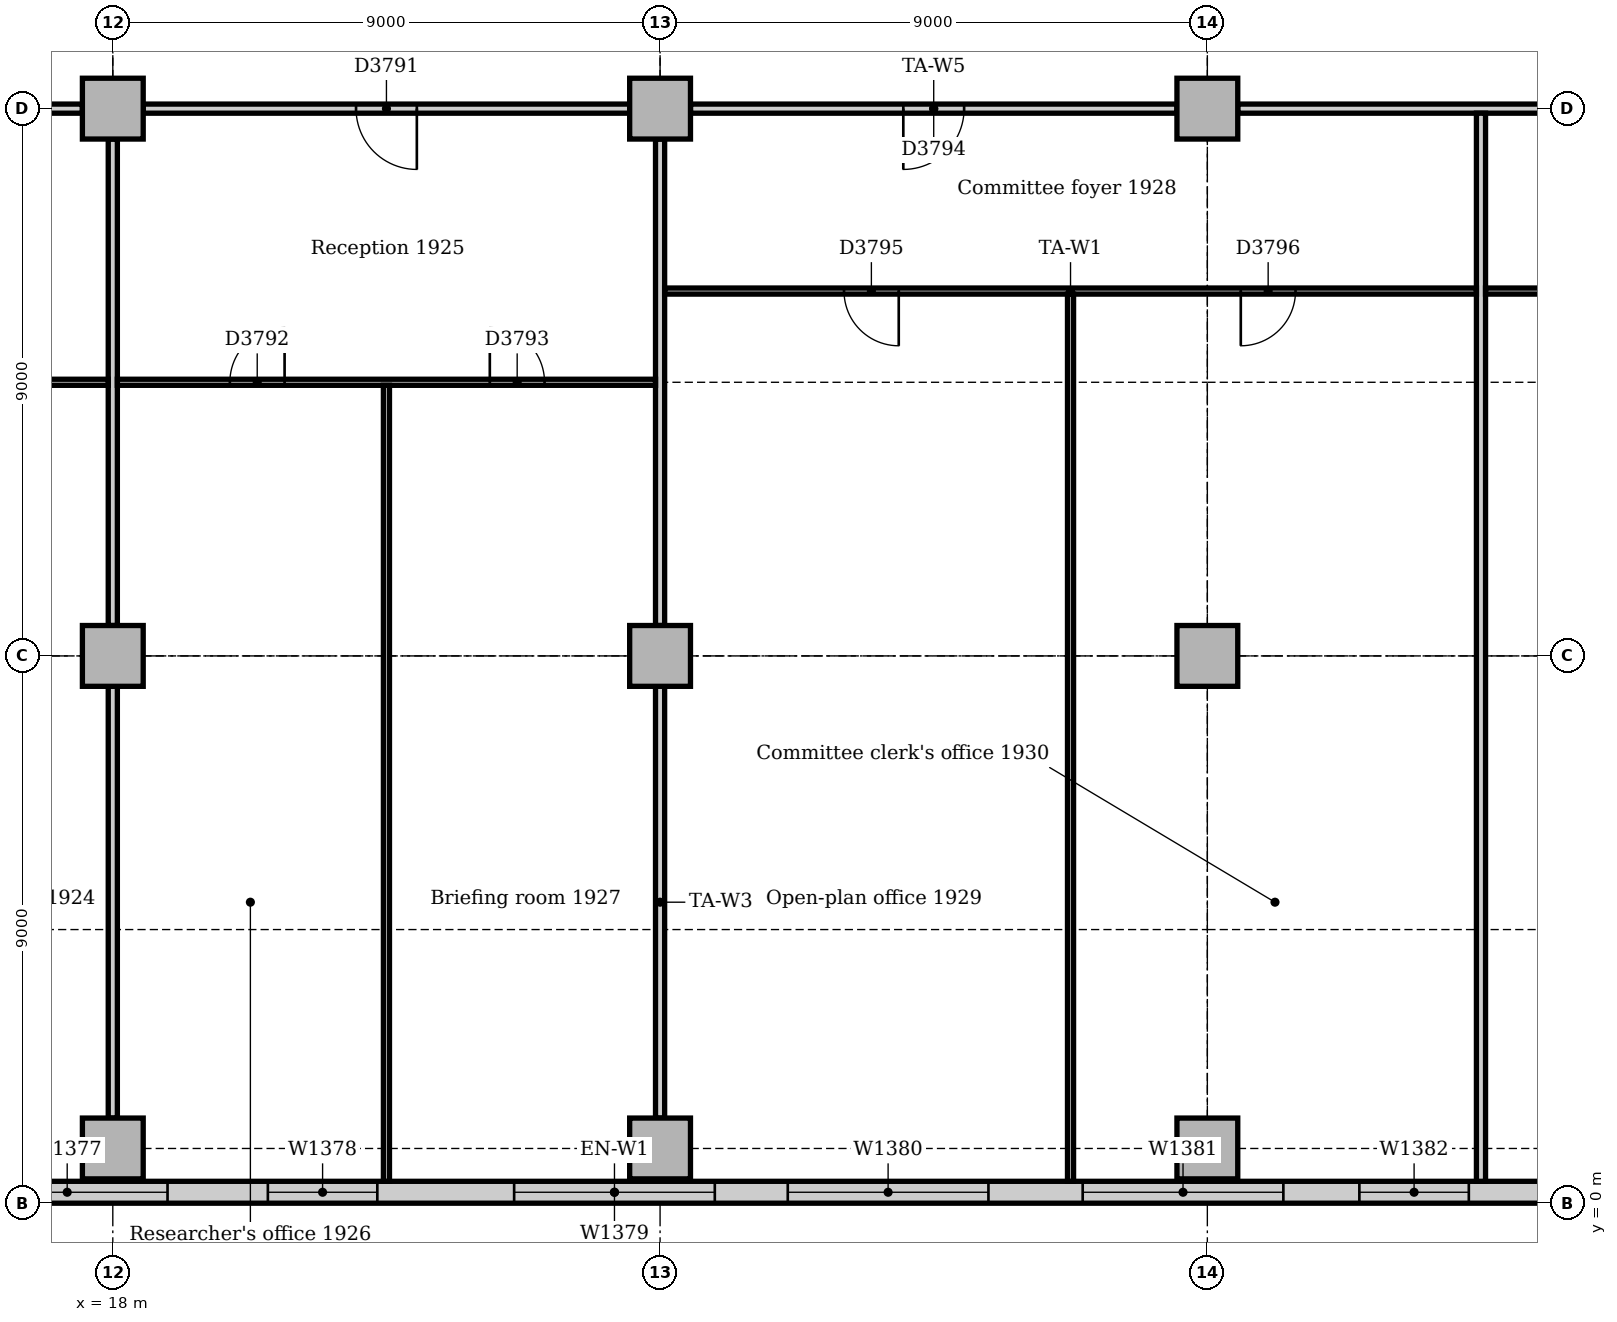
"""IFC4 building model, lengths in metres.
Left out: names, types, materials, properties, quantities, classifications, styles, units other than length and angle.
Written with IfcOpenShell. Run it as: python <this file> out.ifc"""

import sys

from ifc_helpers import new_model, si_unit, direction, frame, frame_2d, origin, origin_2d, place, context, subcontext, project, spatial, rectangle, extrude, element, fill, save


model = new_model("IFC4")
c1 = context("Model", 3, precision=1e-05, world=origin(), true_north=direction((0.0, 1.0)))
c2 = subcontext(c1, "Body", "Model", "MODEL_VIEW")
j1 = project(units=[si_unit("LENGTHUNIT", "METRE"), si_unit("PLANEANGLEUNIT", "RADIAN")], contexts=[c1])
p1 = place(None, origin())
s1 = spatial("IfcSite", under=j1, at=p1, CompositionType="ELEMENT")
p2 = place(p1, origin())
s2 = spatial("IfcBuilding", under=s1, at=p2, CompositionType="ELEMENT")
p3 = place(p2, frame((0.0, 0.0, 83.0)))
s3 = spatial("IfcBuildingStorey", under=s2, at=p3, CompositionType="ELEMENT", Elevation=83.0)
for number, where, z_axis, x_axis in (
    (1, (18.0, 0.9, 0.0), (0.0, 0.0, 1.0), (1.0, 0.0, 0.0)),
    (2, (27.0, 0.9, 0.0), (0.0, 0.0, 1.0), (1.0, 0.0, 0.0)),
    (3, (36.0, 0.9, 0.0), (0.0, 0.0, 1.0), (1.0, 0.0, 0.0)),
    (4, (18.0, 9.0, 0.0), (0.0, 0.0, 1.0), (1.0, 0.0, 0.0)),
    (5, (18.0, 18.0, 0.0), (0.0, 0.0, 1.0), (1.0, 0.0, 0.0)),
    (6, (27.0, 9.0, 0.0), (0.0, 0.0, 1.0), (1.0, 0.0, 0.0)),
    (7, (27.0, 18.0, 0.0), (0.0, 0.0, 1.0), (1.0, 0.0, 0.0)),
    (8, (36.0, 9.0, 0.0), (0.0, 0.0, 1.0), (1.0, 0.0, 0.0)),
    (9, (36.0, 18.0, 0.0), (0.0, 0.0, 1.0), (1.0, 0.0, 0.0)),
):
    element("IfcColumn", number, at=place(p3, frame(where, z_axis=z_axis, x_axis=x_axis)), inside=s3, PredefinedType="COLUMN", context=c2, shape_type="SweptSolid", body=[
        extrude(rectangle(XDim=1.0, YDim=1.0, at=origin_2d()), origin(), (0.0, 0.0, 1.0), 3.85),
    ])
p4 = place(p3, frame((4.243, 0.18, 0.0), z_axis=(0.0, 0.0, 1.0), x_axis=(1.0, 0.0, 0.0)))
e10 = element("IfcWall", 10, at=p4, inside=s3, PredefinedType="STANDARD", context=c2, shape_type="SweptSolid", body=[
    extrude(rectangle(XDim=44.015, YDim=0.36, at=frame_2d((22.007, 0.0))), origin(), (0.0, 0.0, 1.0), 3.85),
])
p5 = place(p4, frame((2.357, 0.0, 0.9)))
e11 = element("IfcOpeningElement", 11, at=p5, cuts=e10, PredefinedType="OPENING", context=c2, shape_type="SweptSolid", body=[
    extrude(rectangle(XDim=3.3, YDim=1.6, at=frame_2d((1.65, 0.8))), frame((0.0, 0.19, 0.0), z_axis=(0.0, -1.0, 0.0), x_axis=(1.0, 0.0, 0.0)), (0.0, 0.0, 1.0), 0.38),
])
p6 = place(p4, frame((7.307, 0.0, 0.9)))
e12 = element("IfcOpeningElement", 12, at=p6, cuts=e10, PredefinedType="OPENING", context=c2, shape_type="SweptSolid", body=[
    extrude(rectangle(XDim=1.8, YDim=1.6, at=frame_2d((0.9, 0.8))), frame((0.0, 0.19, 0.0), z_axis=(0.0, -1.0, 0.0), x_axis=(1.0, 0.0, 0.0)), (0.0, 0.0, 1.0), 0.38),
])
p7 = place(p4, frame((11.357, 0.0, 0.9)))
e13 = element("IfcOpeningElement", 13, at=p7, cuts=e10, PredefinedType="OPENING", context=c2, shape_type="SweptSolid", body=[
    extrude(rectangle(XDim=3.3, YDim=1.6, at=frame_2d((1.65, 0.8))), frame((0.0, 0.19, 0.0), z_axis=(0.0, -1.0, 0.0), x_axis=(1.0, 0.0, 0.0)), (0.0, 0.0, 1.0), 0.38),
])
p8 = place(p4, frame((16.307, 0.0, 0.9)))
e14 = element("IfcOpeningElement", 14, at=p8, cuts=e10, PredefinedType="OPENING", context=c2, shape_type="SweptSolid", body=[
    extrude(rectangle(XDim=1.8, YDim=1.6, at=frame_2d((0.9, 0.8))), frame((0.0, 0.19, 0.0), z_axis=(0.0, -1.0, 0.0), x_axis=(1.0, 0.0, 0.0)), (0.0, 0.0, 1.0), 0.38),
])
p9 = place(p4, frame((20.357, 0.0, 0.9)))
e15 = element("IfcOpeningElement", 15, at=p9, cuts=e10, PredefinedType="OPENING", context=c2, shape_type="SweptSolid", body=[
    extrude(rectangle(XDim=3.3, YDim=1.6, at=frame_2d((1.65, 0.8))), frame((0.0, 0.19, 0.0), z_axis=(0.0, -1.0, 0.0), x_axis=(1.0, 0.0, 0.0)), (0.0, 0.0, 1.0), 0.38),
])
p10 = place(p4, frame((24.857, 0.0, 0.9)))
e16 = element("IfcOpeningElement", 16, at=p10, cuts=e10, PredefinedType="OPENING", context=c2, shape_type="SweptSolid", body=[
    extrude(rectangle(XDim=3.3, YDim=1.6, at=frame_2d((1.65, 0.8))), frame((0.0, 0.19, 0.0), z_axis=(0.0, -1.0, 0.0), x_axis=(1.0, 0.0, 0.0)), (0.0, 0.0, 1.0), 0.38),
])
p11 = place(p4, frame((29.707, 0.0, 0.9)))
e17 = element("IfcOpeningElement", 17, at=p11, cuts=e10, PredefinedType="OPENING", context=c2, shape_type="SweptSolid", body=[
    extrude(rectangle(XDim=3.3, YDim=1.6, at=frame_2d((1.65, 0.8))), frame((0.0, 0.19, 0.0), z_axis=(0.0, -1.0, 0.0), x_axis=(1.0, 0.0, 0.0)), (0.0, 0.0, 1.0), 0.38),
])
p12 = place(p4, frame((34.257, 0.0, 0.9)))
e18 = element("IfcOpeningElement", 18, at=p12, cuts=e10, PredefinedType="OPENING", context=c2, shape_type="SweptSolid", body=[
    extrude(rectangle(XDim=1.8, YDim=1.6, at=frame_2d((0.9, 0.8))), frame((0.0, 0.19, 0.0), z_axis=(0.0, -1.0, 0.0), x_axis=(1.0, 0.0, 0.0)), (0.0, 0.0, 1.0), 0.38),
])
p13 = place(p4, frame((38.357, 0.0, 0.9)))
e19 = element("IfcOpeningElement", 19, at=p13, cuts=e10, PredefinedType="OPENING", context=c2, shape_type="SweptSolid", body=[
    extrude(rectangle(XDim=3.3, YDim=1.6, at=frame_2d((1.65, 0.8))), frame((0.0, 0.19, 0.0), z_axis=(0.0, -1.0, 0.0), x_axis=(1.0, 0.0, 0.0)), (0.0, 0.0, 1.0), 0.38),
])
p14 = place(p3, frame((36.5, 18.0, 0.0), z_axis=(0.0, 0.0, 1.0), x_axis=(1.0, 0.0, 0.0)))
e20 = element("IfcWall", 20, at=p14, inside=s3, PredefinedType="PARTITIONING", context=c2, shape_type="SweptSolid", body=[
    extrude(rectangle(XDim=8.0, YDim=0.15, at=frame_2d((4.0, 0.0))), origin(), (0.0, 0.0, 1.0), 3.15),
])
p15 = place(p3, frame((27.5, 18.0, 0.0), z_axis=(0.0, 0.0, 1.0), x_axis=(1.0, 0.0, 0.0)))
e21 = element("IfcWall", 21, at=p15, inside=s3, PredefinedType="PARTITIONING", context=c2, shape_type="SweptSolid", body=[
    extrude(rectangle(XDim=8.0, YDim=0.15, at=frame_2d((4.0, 0.0))), origin(), (0.0, 0.0, 1.0), 3.15),
])
p16 = place(p15, frame((3.5, 0.0, 0.0)))
e22 = element("IfcOpeningElement", 22, at=p16, cuts=e21, PredefinedType="OPENING", context=c2, shape_type="SweptSolid", body=[
    extrude(rectangle(XDim=1.0, YDim=2.1, at=frame_2d((0.5, 1.05))), frame((0.0, 0.085, 0.0), z_axis=(0.0, -1.0, 0.0), x_axis=(1.0, 0.0, 0.0)), (0.0, 0.0, 1.0), 0.17),
])
p17 = place(p3, frame((18.5, 18.0, 0.0), z_axis=(0.0, 0.0, 1.0), x_axis=(1.0, 0.0, 0.0)))
e23 = element("IfcWall", 23, at=p17, inside=s3, PredefinedType="PARTITIONING", context=c2, shape_type="SweptSolid", body=[
    extrude(rectangle(XDim=8.0, YDim=0.15, at=frame_2d((4.0, 0.0))), origin(), (0.0, 0.0, 1.0), 3.15),
])
p18 = place(p17, frame((3.5, 0.0, 0.0)))
e24 = element("IfcOpeningElement", 24, at=p18, cuts=e23, PredefinedType="OPENING", context=c2, shape_type="SweptSolid", body=[
    extrude(rectangle(XDim=1.0, YDim=2.1, at=frame_2d((0.5, 1.05))), frame((0.0, 0.085, 0.0), z_axis=(0.0, -1.0, 0.0), x_axis=(1.0, 0.0, 0.0)), (0.0, 0.0, 1.0), 0.17),
])
p19 = place(p3, frame((9.5, 18.0, 0.0), z_axis=(0.0, 0.0, 1.0), x_axis=(1.0, 0.0, 0.0)))
e25 = element("IfcWall", 25, at=p19, inside=s3, PredefinedType="PARTITIONING", context=c2, shape_type="SweptSolid", body=[
    extrude(rectangle(XDim=8.0, YDim=0.15, at=frame_2d((4.0, 0.0))), origin(), (0.0, 0.0, 1.0), 3.15),
])
p20 = place(p19, frame((3.5, 0.0, 0.0)))
e26 = element("IfcOpeningElement", 26, at=p20, cuts=e25, PredefinedType="OPENING", context=c2, shape_type="SweptSolid", body=[
    extrude(rectangle(XDim=1.0, YDim=2.1, at=frame_2d((0.5, 1.05))), frame((0.0, 0.085, 0.0), z_axis=(0.0, -1.0, 0.0), x_axis=(1.0, 0.0, 0.0)), (0.0, 0.0, 1.0), 0.17),
])
p21 = place(p3, frame((18.0, 1.4, 0.0), z_axis=(0.0, 0.0, 1.0), x_axis=(0.0, 1.0, 0.0)))
e27 = element("IfcWall", 27, at=p21, inside=s3, PredefinedType="PARTITIONING", context=c2, shape_type="SweptSolid", body=[
    extrude(rectangle(XDim=7.1, YDim=0.15, at=frame_2d((3.55, 0.0))), origin(), (0.0, 0.0, 1.0), 3.158),
])
p22 = place(p3, frame((18.0, 9.5, 0.0), z_axis=(0.0, 0.0, 1.0), x_axis=(0.0, 1.0, 0.0)))
e28 = element("IfcWall", 28, at=p22, inside=s3, PredefinedType="PARTITIONING", context=c2, shape_type="SweptSolid", body=[
    extrude(rectangle(XDim=8.0, YDim=0.15, at=frame_2d((4.0, 0.0))), origin(), (0.0, 0.0, 1.0), 3.158),
])
p23 = place(p3, frame((27.0, 1.4, 0.0), z_axis=(0.0, 0.0, 1.0), x_axis=(0.0, 1.0, 0.0)))
e29 = element("IfcWall", 29, at=p23, inside=s3, PredefinedType="PARTITIONING", context=c2, shape_type="SweptSolid", body=[
    extrude(rectangle(XDim=7.1, YDim=0.15, at=frame_2d((3.55, 0.0))), origin(), (0.0, 0.0, 1.0), 3.158),
])
p24 = place(p3, frame((27.0, 9.5, 0.0), z_axis=(0.0, 0.0, 1.0), x_axis=(0.0, 1.0, 0.0)))
e30 = element("IfcWall", 30, at=p24, inside=s3, PredefinedType="PARTITIONING", context=c2, shape_type="SweptSolid", body=[
    extrude(rectangle(XDim=8.0, YDim=0.15, at=frame_2d((4.0, 0.0))), origin(), (0.0, 0.0, 1.0), 3.158),
])
p25 = place(p3, frame((40.5, 0.36, 0.0), z_axis=(0.0, 0.0, 1.0), x_axis=(0.0, 1.0, 0.0)))
e31 = element("IfcWall", 31, at=p25, inside=s3, PredefinedType="PARTITIONING", context=c2, shape_type="SweptSolid", body=[
    extrude(rectangle(XDim=17.565, YDim=0.15, at=frame_2d((8.783, 0.0))), origin(), (0.0, 0.0, 1.0), 3.85),
])
p26 = place(p3, frame((27.075, 15.0, 0.0), z_axis=(0.0, 0.0, 1.0), x_axis=(1.0, 0.0, 0.0)))
e32 = element("IfcWall", 32, at=p26, inside=s3, PredefinedType="PARTITIONING", context=c2, shape_type="SweptSolid", body=[
    extrude(rectangle(XDim=13.35, YDim=0.1, at=frame_2d((6.675, 0.0))), origin(), (0.0, 0.0, 1.0), 3.85),
])
p27 = place(p26, frame((2.95, 0.0, 0.0)))
e33 = element("IfcOpeningElement", 33, at=p27, cuts=e32, PredefinedType="OPENING", context=c2, shape_type="SweptSolid", body=[
    extrude(rectangle(XDim=0.9, YDim=2.1, at=frame_2d((0.45, 1.05))), frame((0.0, 0.06, 0.0), z_axis=(0.0, -1.0, 0.0), x_axis=(1.0, 0.0, 0.0)), (0.0, 0.0, 1.0), 0.12),
])
p28 = place(p26, frame((9.475, 0.0, 0.0)))
e34 = element("IfcOpeningElement", 34, at=p28, cuts=e32, PredefinedType="OPENING", context=c2, shape_type="SweptSolid", body=[
    extrude(rectangle(XDim=0.9, YDim=2.1, at=frame_2d((0.45, 1.05))), frame((0.0, 0.06, 0.0), z_axis=(0.0, -1.0, 0.0), x_axis=(1.0, 0.0, 0.0)), (0.0, 0.0, 1.0), 0.12),
])
p29 = place(p3, frame((40.575, 15.0, 0.0), z_axis=(0.0, 0.0, 1.0), x_axis=(1.0, 0.0, 0.0)))
e35 = element("IfcWall", 35, at=p29, inside=s3, PredefinedType="PARTITIONING", context=c2, shape_type="SweptSolid", body=[
    extrude(rectangle(XDim=13.35, YDim=0.1, at=frame_2d((6.675, 0.0))), origin(), (0.0, 0.0, 1.0), 3.85),
])
p30 = place(p29, frame((6.2, 0.0, 0.0)))
e36 = element("IfcOpeningElement", 36, at=p30, cuts=e35, PredefinedType="OPENING", context=c2, shape_type="SweptSolid", body=[
    extrude(rectangle(XDim=0.9, YDim=2.1, at=frame_2d((0.45, 1.05))), frame((0.0, 0.06, 0.0), z_axis=(0.0, -1.0, 0.0), x_axis=(1.0, 0.0, 0.0)), (0.0, 0.0, 1.0), 0.12),
])
p31 = place(p3, frame((18.075, 13.5, 0.0), z_axis=(0.0, 0.0, 1.0), x_axis=(1.0, 0.0, 0.0)))
e37 = element("IfcWall", 37, at=p31, inside=s3, PredefinedType="PARTITIONING", context=c2, shape_type="SweptSolid", body=[
    extrude(rectangle(XDim=8.85, YDim=0.1, at=frame_2d((4.425, 0.0))), origin(), (0.0, 0.0, 1.0), 3.35),
])
p32 = place(p31, frame((1.85, 0.0, 0.0)))
e38 = element("IfcOpeningElement", 38, at=p32, cuts=e37, PredefinedType="OPENING", context=c2, shape_type="SweptSolid", body=[
    extrude(rectangle(XDim=0.9, YDim=2.1, at=frame_2d((0.45, 1.05))), frame((0.0, 0.06, 0.0), z_axis=(0.0, -1.0, 0.0), x_axis=(1.0, 0.0, 0.0)), (0.0, 0.0, 1.0), 0.12),
])
p33 = place(p31, frame((6.125, 0.0, 0.0)))
e39 = element("IfcOpeningElement", 39, at=p33, cuts=e37, PredefinedType="OPENING", context=c2, shape_type="SweptSolid", body=[
    extrude(rectangle(XDim=0.9, YDim=2.1, at=frame_2d((0.45, 1.05))), frame((0.0, 0.06, 0.0), z_axis=(0.0, -1.0, 0.0), x_axis=(1.0, 0.0, 0.0)), (0.0, 0.0, 1.0), 0.12),
])
p34 = place(p3, frame((9.075, 13.5, 0.0), z_axis=(0.0, 0.0, 1.0), x_axis=(1.0, 0.0, 0.0)))
e40 = element("IfcWall", 40, at=p34, inside=s3, PredefinedType="PARTITIONING", context=c2, shape_type="SweptSolid", body=[
    extrude(rectangle(XDim=8.85, YDim=0.1, at=frame_2d((4.425, 0.0))), origin(), (0.0, 0.0, 1.0), 3.35),
])
p35 = place(p34, frame((1.85, 0.0, 0.0)))
e41 = element("IfcOpeningElement", 41, at=p35, cuts=e40, PredefinedType="OPENING", context=c2, shape_type="SweptSolid", body=[
    extrude(rectangle(XDim=0.9, YDim=2.1, at=frame_2d((0.45, 1.05))), frame((0.0, 0.06, 0.0), z_axis=(0.0, -1.0, 0.0), x_axis=(1.0, 0.0, 0.0)), (0.0, 0.0, 1.0), 0.12),
])
p36 = place(p34, frame((6.125, 0.0, 0.0)))
e42 = element("IfcOpeningElement", 42, at=p36, cuts=e40, PredefinedType="OPENING", context=c2, shape_type="SweptSolid", body=[
    extrude(rectangle(XDim=0.9, YDim=2.1, at=frame_2d((0.45, 1.05))), frame((0.0, 0.06, 0.0), z_axis=(0.0, -1.0, 0.0), x_axis=(1.0, 0.0, 0.0)), (0.0, 0.0, 1.0), 0.12),
])
p37 = place(p3, frame((33.75, 0.36, 0.0), z_axis=(0.0, 0.0, 1.0), x_axis=(0.0, 1.0, 0.0)))
e43 = element("IfcWall", 43, at=p37, inside=s3, PredefinedType="PARTITIONING", context=c2, shape_type="SweptSolid", body=[
    extrude(rectangle(XDim=14.59, YDim=0.1, at=frame_2d((7.295, 0.0))), origin(), (0.0, 0.0, 1.0), 3.85),
])
p38 = place(p3, frame((22.5, 0.36, 0.0), z_axis=(0.0, 0.0, 1.0), x_axis=(0.0, 1.0, 0.0)))
e44 = element("IfcWall", 44, at=p38, inside=s3, PredefinedType="PARTITIONING", context=c2, shape_type="SweptSolid", body=[
    extrude(rectangle(XDim=13.09, YDim=0.1, at=frame_2d((6.545, 0.0))), origin(), (0.0, 0.0, 1.0), 3.85),
])
p39 = place(p7, origin())
e45 = element("IfcWindow", 45, at=p39, inside=s3, PartitioningType="SINGLE_PANEL", PredefinedType="WINDOW", context=c2, shape_type="SweptSolid", body=[
    extrude(rectangle(XDim=3.3, YDim=1.6, at=frame_2d((1.65, 0.8))), frame((0.0, 0.13, 0.0), z_axis=(0.0, -1.0, 0.0), x_axis=(1.0, 0.0, 0.0)), (0.0, 0.0, 1.0), 0.06),
])
fill(e13, e45)
p40 = place(p8, origin())
e46 = element("IfcWindow", 46, at=p40, inside=s3, PartitioningType="SINGLE_PANEL", PredefinedType="WINDOW", context=c2, shape_type="SweptSolid", body=[
    extrude(rectangle(XDim=1.8, YDim=1.6, at=frame_2d((0.9, 0.8))), frame((0.0, 0.13, 0.0), z_axis=(0.0, -1.0, 0.0), x_axis=(1.0, 0.0, 0.0)), (0.0, 0.0, 1.0), 0.06),
])
fill(e14, e46)
p41 = place(p9, origin())
e47 = element("IfcWindow", 47, at=p41, inside=s3, PartitioningType="SINGLE_PANEL", PredefinedType="WINDOW", context=c2, shape_type="SweptSolid", body=[
    extrude(rectangle(XDim=3.3, YDim=1.6, at=frame_2d((1.65, 0.8))), frame((0.0, 0.13, 0.0), z_axis=(0.0, -1.0, 0.0), x_axis=(1.0, 0.0, 0.0)), (0.0, 0.0, 1.0), 0.06),
])
fill(e15, e47)
p42 = place(p10, origin())
e48 = element("IfcWindow", 48, at=p42, inside=s3, PartitioningType="SINGLE_PANEL", PredefinedType="WINDOW", context=c2, shape_type="SweptSolid", body=[
    extrude(rectangle(XDim=3.3, YDim=1.6, at=frame_2d((1.65, 0.8))), frame((0.0, 0.13, 0.0), z_axis=(0.0, -1.0, 0.0), x_axis=(1.0, 0.0, 0.0)), (0.0, 0.0, 1.0), 0.06),
])
fill(e16, e48)
p43 = place(p11, origin())
e49 = element("IfcWindow", 49, at=p43, inside=s3, PartitioningType="SINGLE_PANEL", PredefinedType="WINDOW", context=c2, shape_type="SweptSolid", body=[
    extrude(rectangle(XDim=3.3, YDim=1.6, at=frame_2d((1.65, 0.8))), frame((0.0, 0.13, 0.0), z_axis=(0.0, -1.0, 0.0), x_axis=(1.0, 0.0, 0.0)), (0.0, 0.0, 1.0), 0.06),
])
fill(e17, e49)
p44 = place(p12, origin())
e50 = element("IfcWindow", 50, at=p44, inside=s3, PartitioningType="SINGLE_PANEL", PredefinedType="WINDOW", context=c2, shape_type="SweptSolid", body=[
    extrude(rectangle(XDim=1.8, YDim=1.6, at=frame_2d((0.9, 0.8))), frame((0.0, 0.13, 0.0), z_axis=(0.0, -1.0, 0.0), x_axis=(1.0, 0.0, 0.0)), (0.0, 0.0, 1.0), 0.06),
])
fill(e18, e50)
p45 = place(p18, frame((1.0, 0.0, 0.0), z_axis=(0.0, 0.0, 1.0), x_axis=(-1.0, 0.0, 0.0)))
e51 = element("IfcDoor", 51, at=p45, inside=s3, OperationType="SINGLE_SWING_LEFT", PredefinedType="DOOR", context=c2, shape_type="SweptSolid", body=[
    extrude(rectangle(XDim=1.0, YDim=2.1, at=frame_2d((0.5, 1.05))), frame((0.0, 0.025, 0.0), z_axis=(0.0, -1.0, 0.0), x_axis=(1.0, 0.0, 0.0)), (0.0, 0.0, 1.0), 0.05),
])
fill(e24, e51)
p46 = place(p32, origin())
e52 = element("IfcDoor", 52, at=p46, inside=s3, OperationType="SINGLE_SWING_RIGHT", PredefinedType="DOOR", context=c2, shape_type="SweptSolid", body=[
    extrude(rectangle(XDim=0.9, YDim=2.1, at=frame_2d((0.45, 1.05))), frame((0.0, 0.025, 0.0), z_axis=(0.0, -1.0, 0.0), x_axis=(1.0, 0.0, 0.0)), (0.0, 0.0, 1.0), 0.05),
])
fill(e38, e52)
p47 = place(p33, origin())
e53 = element("IfcDoor", 53, at=p47, inside=s3, OperationType="SINGLE_SWING_LEFT", PredefinedType="DOOR", context=c2, shape_type="SweptSolid", body=[
    extrude(rectangle(XDim=0.9, YDim=2.1, at=frame_2d((0.45, 1.05))), frame((0.0, 0.025, 0.0), z_axis=(0.0, -1.0, 0.0), x_axis=(1.0, 0.0, 0.0)), (0.0, 0.0, 1.0), 0.05),
])
fill(e39, e53)
p48 = place(p16, frame((1.0, 0.0, 0.0), z_axis=(0.0, 0.0, 1.0), x_axis=(-1.0, 0.0, 0.0)))
e54 = element("IfcDoor", 54, at=p48, inside=s3, OperationType="SINGLE_SWING_RIGHT", PredefinedType="DOOR", context=c2, shape_type="SweptSolid", body=[
    extrude(rectangle(XDim=1.0, YDim=2.1, at=frame_2d((0.5, 1.05))), frame((0.0, 0.025, 0.0), z_axis=(0.0, -1.0, 0.0), x_axis=(1.0, 0.0, 0.0)), (0.0, 0.0, 1.0), 0.05),
])
fill(e22, e54)
p49 = place(p27, frame((0.9, 0.0, 0.0), z_axis=(0.0, 0.0, 1.0), x_axis=(-1.0, 0.0, 0.0)))
e55 = element("IfcDoor", 55, at=p49, inside=s3, OperationType="SINGLE_SWING_LEFT", PredefinedType="DOOR", context=c2, shape_type="SweptSolid", body=[
    extrude(rectangle(XDim=0.9, YDim=2.1, at=frame_2d((0.45, 1.05))), frame((0.0, 0.025, 0.0), z_axis=(0.0, -1.0, 0.0), x_axis=(1.0, 0.0, 0.0)), (0.0, 0.0, 1.0), 0.05),
])
fill(e33, e55)
p50 = place(p28, frame((0.9, 0.0, 0.0), z_axis=(0.0, 0.0, 1.0), x_axis=(-1.0, 0.0, 0.0)))
e56 = element("IfcDoor", 56, at=p50, inside=s3, OperationType="SINGLE_SWING_RIGHT", PredefinedType="DOOR", context=c2, shape_type="SweptSolid", body=[
    extrude(rectangle(XDim=0.9, YDim=2.1, at=frame_2d((0.45, 1.05))), frame((0.0, 0.025, 0.0), z_axis=(0.0, -1.0, 0.0), x_axis=(1.0, 0.0, 0.0)), (0.0, 0.0, 1.0), 0.05),
])
fill(e34, e56)
save(model, sys.argv[1])
